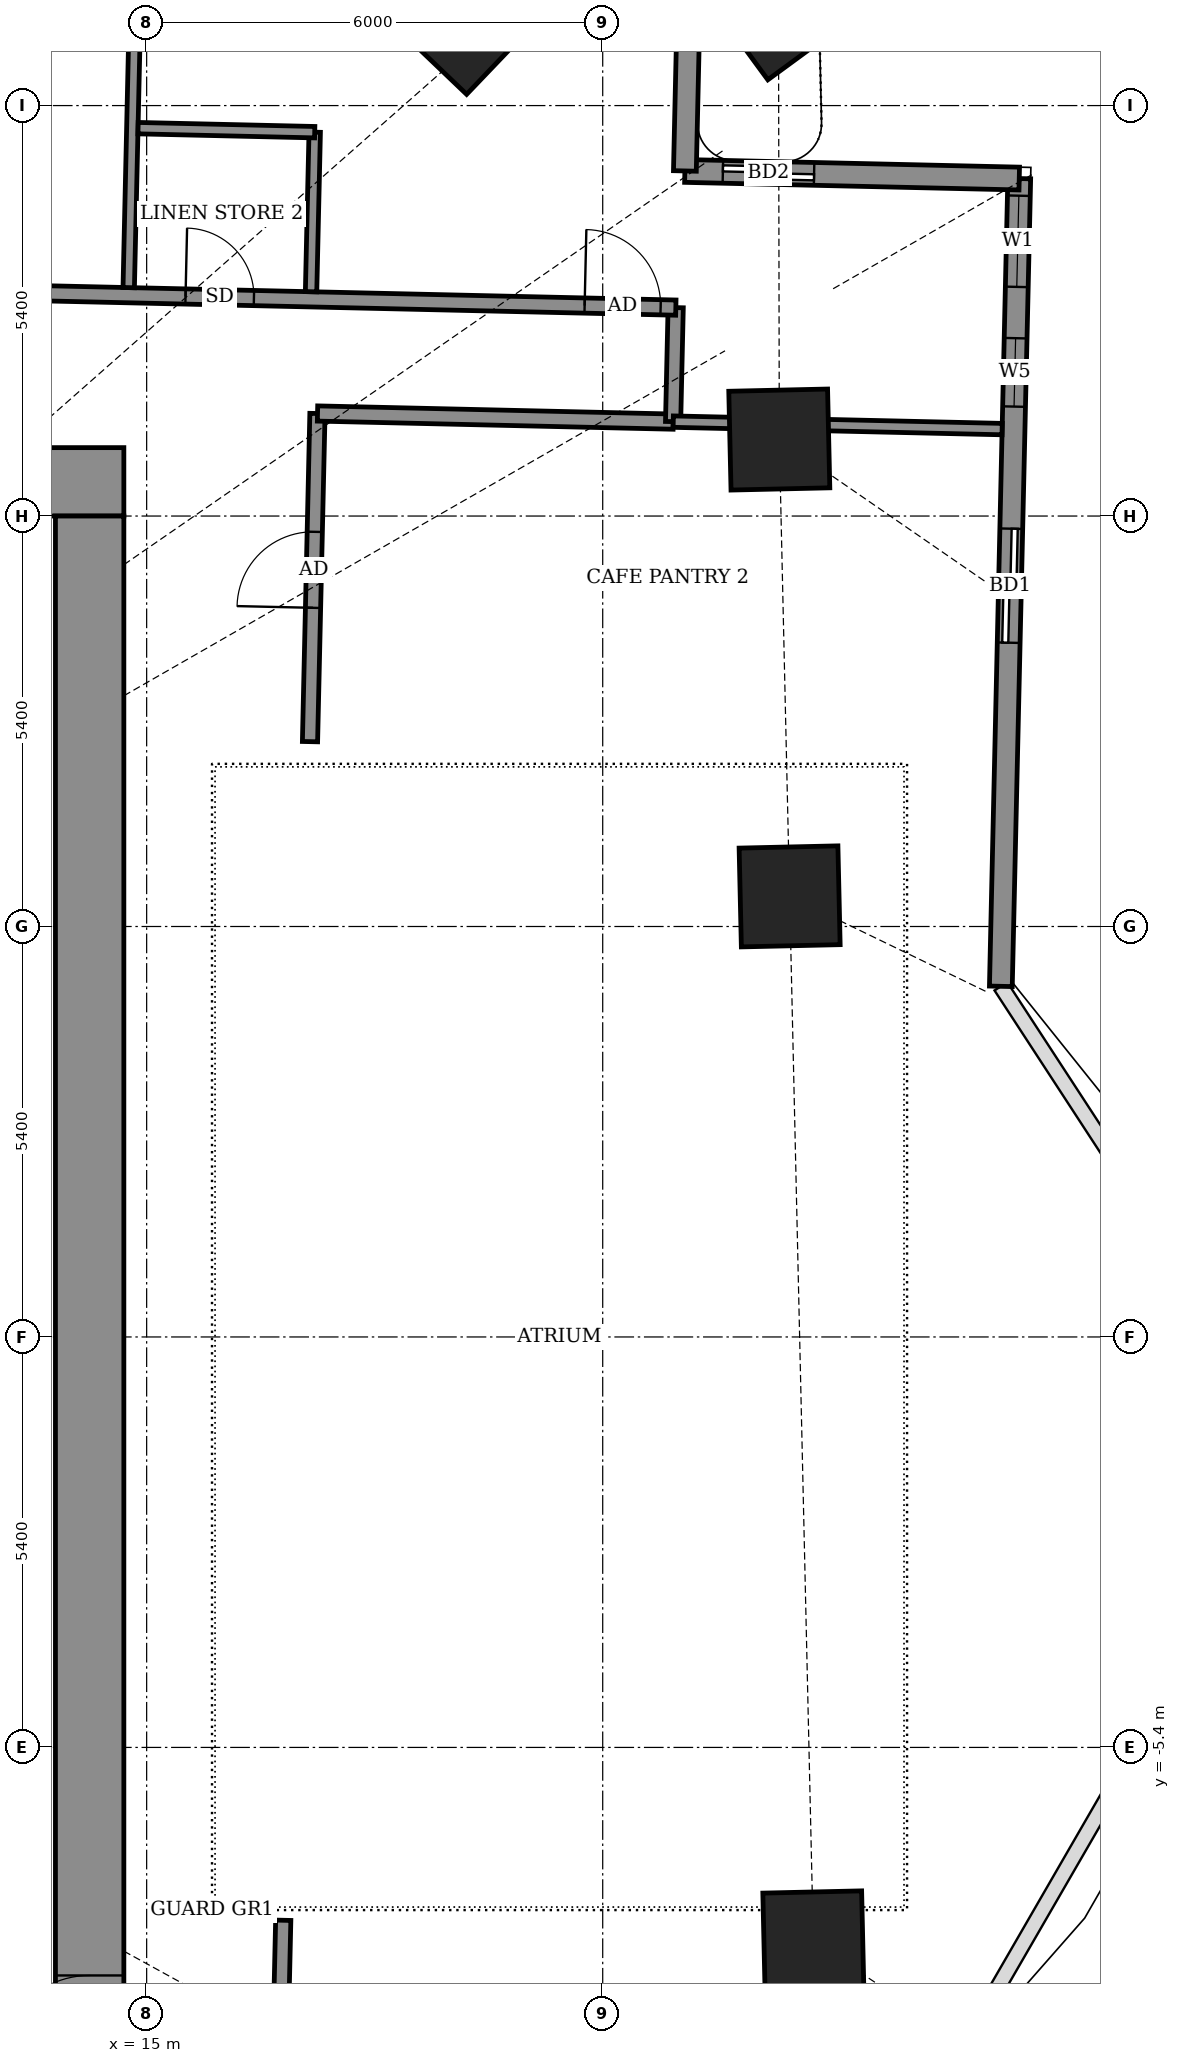
"""IFC4 building model, lengths in metres.
Left out: names, types, materials, properties, quantities, classifications, styles, units other than length and angle.
Written with IfcOpenShell. Run it as: python <this file> out.ifc"""

import sys

from ifc_helpers import new_model, si_unit, direction, frame, frame_2d, origin, origin_2d, place, context, subcontext, project, spatial, rectangle, extrude, element, fill, save


model = new_model("IFC4")
c1 = context("Model", 3, precision=1e-05, world=origin(), true_north=direction((0.0, 1.0)))
c2 = subcontext(c1, "Body", "Model", "MODEL_VIEW")
j1 = project(units=[si_unit("LENGTHUNIT", "METRE"), si_unit("PLANEANGLEUNIT", "RADIAN")], contexts=[c1])
p1 = place(None, origin())
s1 = spatial("IfcSite", under=j1, at=p1, CompositionType="ELEMENT")
p2 = place(p1, origin())
s2 = spatial("IfcBuilding", under=s1, at=p2, CompositionType="ELEMENT")
p3 = place(p2, frame((0.0, 0.0, 148.1)))
s3 = spatial("IfcBuildingStorey", under=s2, at=p3, CompositionType="ELEMENT", Elevation=148.1)
for number, where, z_axis, x_axis in (
    (1, (23.771, -7.952, -0.55), (0.0, 0.0, 1.0), (-0.023, 1.0, 0.0)),
    (2, (23.459, 5.796, -0.55), (0.0, 0.0, 1.0), (-0.023, 1.0, 0.0)),
    (3, (23.323, 11.806, -0.55), (0.0, 0.0, 1.0), (-0.023, 1.0, 0.0)),
    (4, (23.313, 17.448, -0.55), (0.0, 0.0, 1.0), (-0.591, 0.807, 0.0)),
    (5, (19.189, 17.267, -0.55), (0.0, 0.0, 1.0), (-0.723, 0.691, 0.0)),
):
    element("IfcColumn", number, at=place(p3, frame(where, z_axis=z_axis, x_axis=x_axis)), inside=s3, PredefinedType="COLUMN", context=c2, shape_type="SweptSolid", body=[
        extrude(rectangle(XDim=1.3, YDim=1.3, at=origin_2d()), origin(), (0.0, 0.0, 1.0), 4.6),
    ])
p4 = place(p3, frame((26.238, 4.613, 0.0), z_axis=(0.0, 0.0, 1.0), x_axis=(0.022761056451, 0.999740933597, 0.0)))
e6 = element("IfcWall", 6, at=p4, inside=s3, PredefinedType="SOLIDWALL", context=c2, shape_type="SweptSolid", body=[
    extrude(rectangle(XDim=10.63, YDim=0.3, at=frame_2d((5.315, 0.0))), origin(), (0.0, 0.0, 1.0), 2.85),
])
p5 = place(p4, frame((4.522, 0.0, 0.0)))
e7 = element("IfcOpeningElement", 7, at=p5, cuts=e6, PredefinedType="OPENING", context=c2, shape_type="SweptSolid", body=[
    extrude(rectangle(XDim=1.5, YDim=2.4, at=frame_2d((0.75, 1.2))), frame((0.0, 0.16, 0.0), z_axis=(0.0, -1.0, 0.0), x_axis=(1.0, 0.0, 0.0)), (0.0, 0.0, 1.0), 0.32),
])
p6 = place(p4, frame((7.629, 0.0, 0.9)))
e8 = element("IfcOpeningElement", 8, at=p6, cuts=e6, PredefinedType="OPENING", context=c2, shape_type="SweptSolid", body=[
    extrude(rectangle(XDim=0.9, YDim=1.5, at=frame_2d((0.45, 0.75))), frame((0.0, 0.16, 0.0), z_axis=(0.0, -1.0, 0.0), x_axis=(1.0, 0.0, 0.0)), (0.0, 0.0, 1.0), 0.32),
])
p7 = place(p4, frame((9.204, 0.0, 0.9)))
e9 = element("IfcOpeningElement", 9, at=p7, cuts=e6, PredefinedType="OPENING", context=c2, shape_type="SweptSolid", body=[
    extrude(rectangle(XDim=1.2, YDim=1.5, at=frame_2d((0.6, 0.75))), frame((0.0, 0.16, 0.0), z_axis=(0.0, -1.0, 0.0), x_axis=(1.0, 0.0, 0.0)), (0.0, 0.0, 1.0), 0.32),
])
p8 = place(p3, frame((26.48, 15.24, 0.0), z_axis=(0.0, 0.0, 1.0), x_axis=(-0.999741204967, 0.022749133868, 0.0)))
e10 = element("IfcWall", 10, at=p8, inside=s3, PredefinedType="SOLIDWALL", context=c2, shape_type="SweptSolid", body=[
    extrude(rectangle(XDim=4.4, YDim=0.3, at=frame_2d((2.2, 0.0))), origin(), (0.0, 0.0, 1.0), 2.75),
])
p9 = place(p8, frame((2.7, 0.0, 0.0)))
e11 = element("IfcOpeningElement", 11, at=p9, cuts=e10, PredefinedType="OPENING", context=c2, shape_type="SweptSolid", body=[
    extrude(rectangle(XDim=1.2, YDim=2.4, at=frame_2d((0.6, 1.2))), frame((0.0, 0.16, 0.0), z_axis=(0.0, -1.0, 0.0), x_axis=(1.0, 0.0, 0.0)), (0.0, 0.0, 1.0), 0.32),
])
p10 = place(p3, frame((22.081, 15.34, 0.0), z_axis=(0.0, 0.0, 1.0), x_axis=(0.022693676786, 0.999742465355, 0.0)))
e12 = element("IfcWall", 12, at=p10, inside=s3, PredefinedType="SOLIDWALL", context=c2, shape_type="SweptSolid", body=[
    extrude(rectangle(XDim=4.4, YDim=0.3, at=frame_2d((2.2, 0.0))), origin(), (0.0, 0.0, 1.0), 2.75),
])
p11 = place(p10, frame((3.248, 0.0, 0.9)))
e13 = element("IfcOpeningElement", 13, at=p11, cuts=e12, PredefinedType="OPENING", context=c2, shape_type="SweptSolid", body=[
    extrude(rectangle(XDim=0.9, YDim=1.5, at=frame_2d((0.45, 0.75))), frame((0.0, 0.16, 0.0), z_axis=(0.0, -1.0, 0.0), x_axis=(1.0, 0.0, 0.0)), (0.0, 0.0, 1.0), 0.32),
])
p12 = place(p3, frame((16.611, -15.868, 0.0), z_axis=(0.0, 0.0, 1.0), x_axis=(0.022698399288, 0.999742358145, 0.0)))
e14 = element("IfcWall", 14, at=p12, inside=s3, PredefinedType="PARTITIONING", context=c2, shape_type="SweptSolid", body=[
    extrude(rectangle(XDim=8.196, YDim=0.2, at=frame_2d((4.098, 0.0))), origin(), (0.0, 0.0, 1.0), 2.85),
])
p13 = place(p12, frame((3.513, 0.0, 0.0)))
e15 = element("IfcOpeningElement", 15, at=p13, cuts=e14, PredefinedType="OPENING", context=c2, shape_type="SweptSolid", body=[
    extrude(rectangle(XDim=1.0, YDim=2.1, at=frame_2d((0.5, 1.05))), frame((0.0, 0.11, 0.0), z_axis=(0.0, -1.0, 0.0), x_axis=(1.0, 0.0, 0.0)), (0.0, 0.0, 1.0), 0.22),
])
p14 = place(p3, frame((17.149, 7.832, 0.0), z_axis=(0.0, 0.0, 1.0), x_axis=(0.022729111383, 0.999741660378, 0.0)))
e16 = element("IfcWall", 16, at=p14, inside=s3, PredefinedType="PARTITIONING", context=c2, shape_type="SweptSolid", body=[
    extrude(rectangle(XDim=4.318, YDim=0.2, at=frame_2d((2.159, 0.0))), origin(), (0.0, 0.0, 1.0), 2.85),
])
p15 = place(p14, frame((1.761, 0.0, 0.0)))
e17 = element("IfcOpeningElement", 17, at=p15, cuts=e16, PredefinedType="OPENING", context=c2, shape_type="SweptSolid", body=[
    extrude(rectangle(XDim=1.0, YDim=2.1, at=frame_2d((0.5, 1.05))), frame((0.0, 0.11, 0.0), z_axis=(0.0, -1.0, 0.0), x_axis=(1.0, 0.0, 0.0)), (0.0, 0.0, 1.0), 0.22),
])
p16 = place(p3, frame((17.248, 12.149, 0.0), z_axis=(0.0, 0.0, 1.0), x_axis=(0.999739054811, -0.022843429809, 0.0)))
e18 = element("IfcWall", 18, at=p16, inside=s3, PredefinedType="PARTITIONING", context=c2, shape_type="SweptSolid", body=[
    extrude(rectangle(XDim=4.681, YDim=0.2, at=frame_2d((2.341, 0.0))), origin(), (0.0, 0.0, 1.0), 2.85),
])
p17 = place(p3, frame((21.926, 12.042, 0.0), z_axis=(0.0, 0.0, 1.0), x_axis=(0.022617910375, 0.999744182344, 0.0)))
e19 = element("IfcWall", 19, at=p17, inside=s3, PredefinedType="PARTITIONING", context=c2, shape_type="SweptSolid", body=[
    extrude(rectangle(XDim=1.5, YDim=0.2, at=frame_2d((0.75, 0.0))), origin(), (0.0, 0.0, 1.0), 2.85),
])
p18 = place(p3, frame((21.928, 12.042, 0.0), z_axis=(0.0, 0.0, 1.0), x_axis=(0.999744131062, -0.022620176977, 0.0)))
e20 = element("IfcWall", 20, at=p18, inside=s3, PredefinedType="PARTITIONING", context=c2, shape_type="SweptSolid", body=[
    extrude(rectangle(XDim=4.328, YDim=0.15, at=frame_2d((2.164, 0.0))), origin(), (0.0, 0.0, 1.0), 2.85),
])
p19 = place(p3, frame((-21.279, 14.523, 0.0), z_axis=(0.0, 0.0, 1.0), x_axis=(0.999742775939, -0.022679990253, 0.0)))
e21 = element("IfcWall", 21, at=p19, inside=s3, PredefinedType="PARTITIONING", context=c2, shape_type="SweptSolid", body=[
    extrude(rectangle(XDim=43.252, YDim=0.2, at=frame_2d((21.626, 0.0))), origin(), (0.0, 0.0, 1.0), 2.75),
])
p20 = place(p19, frame((42.052, 0.0, 0.0)))
e22 = element("IfcOpeningElement", 22, at=p20, cuts=e21, PredefinedType="OPENING", context=c2, shape_type="SweptSolid", body=[
    extrude(rectangle(XDim=1.0, YDim=2.1, at=frame_2d((0.5, 1.05))), frame((0.0, 0.11, 0.0), z_axis=(0.0, -1.0, 0.0), x_axis=(1.0, 0.0, 0.0)), (0.0, 0.0, 1.0), 0.22),
])
p21 = place(p19, frame((36.8, 0.0, 0.0)))
e23 = element("IfcOpeningElement", 23, at=p21, cuts=e21, PredefinedType="OPENING", context=c2, shape_type="SweptSolid", body=[
    extrude(rectangle(XDim=0.9, YDim=2.1, at=frame_2d((0.45, 1.05))), frame((0.0, 0.11, 0.0), z_axis=(0.0, -1.0, 0.0), x_axis=(1.0, 0.0, 0.0)), (0.0, 0.0, 1.0), 0.22),
])
p22 = place(p19, frame((32.625, 0.0, 0.0)))
e24 = element("IfcOpeningElement", 24, at=p22, cuts=e21, PredefinedType="OPENING", context=c2, shape_type="SweptSolid", body=[
    extrude(rectangle(XDim=1.0, YDim=2.1, at=frame_2d((0.5, 1.05))), frame((0.0, 0.11, 0.0), z_axis=(0.0, -1.0, 0.0), x_axis=(1.0, 0.0, 0.0)), (0.0, 0.0, 1.0), 0.22),
])
p23 = place(p19, frame((27.9, 0.0, 0.0)))
e25 = element("IfcOpeningElement", 25, at=p23, cuts=e21, PredefinedType="OPENING", context=c2, shape_type="SweptSolid", body=[
    extrude(rectangle(XDim=1.0, YDim=2.1, at=frame_2d((0.5, 1.05))), frame((0.0, 0.11, 0.0), z_axis=(0.0, -1.0, 0.0), x_axis=(1.0, 0.0, 0.0)), (0.0, 0.0, 1.0), 0.22),
])
p24 = place(p19, frame((24.95, 0.0, 0.0)))
e26 = element("IfcOpeningElement", 26, at=p24, cuts=e21, PredefinedType="OPENING", context=c2, shape_type="SweptSolid", body=[
    extrude(rectangle(XDim=0.9, YDim=2.1, at=frame_2d((0.45, 1.05))), frame((0.0, 0.11, 0.0), z_axis=(0.0, -1.0, 0.0), x_axis=(1.0, 0.0, 0.0)), (0.0, 0.0, 1.0), 0.22),
])
p25 = place(p19, frame((20.075, 0.0, 0.0)))
e27 = element("IfcOpeningElement", 27, at=p25, cuts=e21, PredefinedType="OPENING", context=c2, shape_type="SweptSolid", body=[
    extrude(rectangle(XDim=0.9, YDim=2.1, at=frame_2d((0.45, 1.05))), frame((0.0, 0.11, 0.0), z_axis=(0.0, -1.0, 0.0), x_axis=(1.0, 0.0, 0.0)), (0.0, 0.0, 1.0), 0.22),
])
p26 = place(p19, frame((16.25, 0.0, 0.0)))
e28 = element("IfcOpeningElement", 28, at=p26, cuts=e21, PredefinedType="OPENING", context=c2, shape_type="SweptSolid", body=[
    extrude(rectangle(XDim=1.0, YDim=2.1, at=frame_2d((0.5, 1.05))), frame((0.0, 0.11, 0.0), z_axis=(0.0, -1.0, 0.0), x_axis=(1.0, 0.0, 0.0)), (0.0, 0.0, 1.0), 0.22),
])
p27 = place(p19, frame((12.6, 0.0, 0.0)))
e29 = element("IfcOpeningElement", 29, at=p27, cuts=e21, PredefinedType="OPENING", context=c2, shape_type="SweptSolid", body=[
    extrude(rectangle(XDim=0.9, YDim=2.1, at=frame_2d((0.45, 1.05))), frame((0.0, 0.11, 0.0), z_axis=(0.0, -1.0, 0.0), x_axis=(1.0, 0.0, 0.0)), (0.0, 0.0, 1.0), 0.22),
])
p28 = place(p19, frame((3.525, 0.0, 0.0)))
e30 = element("IfcOpeningElement", 30, at=p28, cuts=e21, PredefinedType="OPENING", context=c2, shape_type="SweptSolid", body=[
    extrude(rectangle(XDim=1.0, YDim=2.1, at=frame_2d((0.5, 1.05))), frame((0.0, 0.11, 0.0), z_axis=(0.0, -1.0, 0.0), x_axis=(1.0, 0.0, 0.0)), (0.0, 0.0, 1.0), 0.22),
])
p29 = place(p19, frame((10.2, 0.0, 0.0)))
e31 = element("IfcOpeningElement", 31, at=p29, cuts=e21, PredefinedType="OPENING", context=c2, shape_type="SweptSolid", body=[
    extrude(rectangle(XDim=0.9, YDim=2.1, at=frame_2d((0.45, 1.05))), frame((0.0, 0.11, 0.0), z_axis=(0.0, -1.0, 0.0), x_axis=(1.0, 0.0, 0.0)), (0.0, 0.0, 1.0), 0.22),
])
p30 = place(p3, frame((14.764, 13.805, 0.0), z_axis=(0.0, 0.0, 1.0), x_axis=(0.022688785847, 0.999742576365, 0.0)))
e32 = element("IfcWall", 32, at=p30, inside=s3, PredefinedType="PARTITIONING", context=c2, shape_type="SweptSolid", body=[
    extrude(rectangle(XDim=5.95, YDim=0.15, at=frame_2d((2.975, 0.0))), origin(), (0.0, 0.0, 1.0), 2.85),
])
p31 = place(p3, frame((17.163, 13.751, 0.0), z_axis=(0.0, 0.0, 1.0), x_axis=(0.02279007832, 0.999740272436, 0.0)))
e33 = element("IfcWall", 33, at=p31, inside=s3, PredefinedType="PARTITIONING", context=c2, shape_type="SweptSolid", body=[
    extrude(rectangle(XDim=2.1, YDim=0.15, at=frame_2d((1.05, 0.0))), origin(), (0.0, 0.0, 1.0), 2.85),
])
p32 = place(p3, frame((14.887, 15.903, 0.0), z_axis=(0.0, 0.0, 1.0), x_axis=(0.999740260747, -0.02279059109, 0.0)))
e34 = element("IfcWall", 34, at=p32, inside=s3, PredefinedType="PARTITIONING", context=c2, shape_type="SweptSolid", body=[
    extrude(rectangle(XDim=2.324, YDim=0.15, at=frame_2d((1.162, 0.0))), origin(), (0.0, 0.0, 1.0), 2.85),
])
p33 = place(p3, frame((-14.7, 11.25, 0.0), z_axis=(0.0, 0.0, 1.0), x_axis=(1.0, 0.0, 0.0)))
e35 = element("IfcWall", 35, at=p33, inside=s3, PredefinedType="SHEAR", context=c2, shape_type="SweptSolid", body=[
    extrude(rectangle(XDim=29.4, YDim=0.9, at=frame_2d((14.7, 0.0))), origin(), (0.0, 0.0, 1.0), 4.6),
])
p34 = place(p3, frame((14.25, -10.8, 0.0), z_axis=(0.0, 0.0, 1.0), x_axis=(0.0, 1.0, 0.0)))
e36 = element("IfcWall", 36, at=p34, inside=s3, PredefinedType="SHEAR", context=c2, shape_type="SweptSolid", body=[
    extrude(rectangle(XDim=21.6, YDim=0.9, at=frame_2d((10.8, 0.0))), origin(), (0.0, 0.0, 1.0), 4.6),
])
p35 = place(p34, frame((1.2, 0.0, 0.0)))
e37 = element("IfcOpeningElement", 37, at=p35, cuts=e36, PredefinedType="OPENING", context=c2, shape_type="SweptSolid", body=[
    extrude(rectangle(XDim=1.2, YDim=2.1, at=frame_2d((0.6, 1.05))), frame((0.0, 0.46, 0.0), z_axis=(0.0, -1.0, 0.0), x_axis=(1.0, 0.0, 0.0)), (0.0, 0.0, 1.0), 0.92),
])
p36 = place(p5, origin())
e38 = element("IfcDoor", 38, at=p36, inside=s3, OperationType="SLIDING_TO_LEFT", PredefinedType="DOOR", context=c2, shape_type="SweptSolid", body=[
    extrude(rectangle(XDim=1.5, YDim=2.4, at=frame_2d((0.75, 1.2))), frame((0.0, 0.025, 0.0), z_axis=(0.0, -1.0, 0.0), x_axis=(1.0, 0.0, 0.0)), (0.0, 0.0, 1.0), 0.05),
])
fill(e7, e38)
p37 = place(p6, origin())
e39 = element("IfcWindow", 39, at=p37, inside=s3, PartitioningType="SINGLE_PANEL", PredefinedType="WINDOW", context=c2, shape_type="SweptSolid", body=[
    extrude(rectangle(XDim=0.9, YDim=1.5, at=frame_2d((0.45, 0.75))), frame((0.0, 0.03, 0.0), z_axis=(0.0, -1.0, 0.0), x_axis=(1.0, 0.0, 0.0)), (0.0, 0.0, 1.0), 0.06),
])
fill(e8, e39)
p38 = place(p7, origin())
e40 = element("IfcWindow", 40, at=p38, inside=s3, PartitioningType="SINGLE_PANEL", PredefinedType="WINDOW", context=c2, shape_type="SweptSolid", body=[
    extrude(rectangle(XDim=1.2, YDim=1.5, at=frame_2d((0.6, 0.75))), frame((0.0, 0.03, 0.0), z_axis=(0.0, -1.0, 0.0), x_axis=(1.0, 0.0, 0.0)), (0.0, 0.0, 1.0), 0.06),
])
fill(e9, e40)
p39 = place(p9, origin())
e41 = element("IfcDoor", 41, at=p39, inside=s3, OperationType="SLIDING_TO_LEFT", PredefinedType="DOOR", context=c2, shape_type="SweptSolid", body=[
    extrude(rectangle(XDim=1.2, YDim=2.4, at=frame_2d((0.6, 1.2))), frame((0.0, 0.025, 0.0), z_axis=(0.0, -1.0, 0.0), x_axis=(1.0, 0.0, 0.0)), (0.0, 0.0, 1.0), 0.05),
])
fill(e11, e41)
p40 = place(p15, origin())
e42 = element("IfcDoor", 42, at=p40, inside=s3, OperationType="SINGLE_SWING_LEFT", PredefinedType="DOOR", context=c2, shape_type="SweptSolid", body=[
    extrude(rectangle(XDim=1.0, YDim=2.1, at=frame_2d((0.5, 1.05))), frame((0.0, 0.025, 0.0), z_axis=(0.0, -1.0, 0.0), x_axis=(1.0, 0.0, 0.0)), (0.0, 0.0, 1.0), 0.05),
])
fill(e17, e42)
p41 = place(p20, origin())
e43 = element("IfcDoor", 43, at=p41, inside=s3, OperationType="SINGLE_SWING_RIGHT", PredefinedType="DOOR", context=c2, shape_type="SweptSolid", body=[
    extrude(rectangle(XDim=1.0, YDim=2.1, at=frame_2d((0.5, 1.05))), frame((0.0, 0.025, 0.0), z_axis=(0.0, -1.0, 0.0), x_axis=(1.0, 0.0, 0.0)), (0.0, 0.0, 1.0), 0.05),
])
fill(e22, e43)
p42 = place(p21, origin())
e44 = element("IfcDoor", 44, at=p42, inside=s3, OperationType="SINGLE_SWING_LEFT", PredefinedType="DOOR", context=c2, shape_type="SweptSolid", body=[
    extrude(rectangle(XDim=0.9, YDim=2.1, at=frame_2d((0.45, 1.05))), frame((0.0, 0.025, 0.0), z_axis=(0.0, -1.0, 0.0), x_axis=(1.0, 0.0, 0.0)), (0.0, 0.0, 1.0), 0.05),
])
fill(e23, e44)
p43 = place(p35, origin())
e45 = element("IfcDoor", 45, at=p43, inside=s3, OperationType="DOUBLE_DOOR_SINGLE_SWING", PredefinedType="DOOR", context=c2, shape_type="SweptSolid", body=[
    extrude(rectangle(XDim=1.2, YDim=2.1, at=frame_2d((0.6, 1.05))), frame((0.0, 0.025, 0.0), z_axis=(0.0, -1.0, 0.0), x_axis=(1.0, 0.0, 0.0)), (0.0, 0.0, 1.0), 0.05),
])
fill(e37, e45)
save(model, sys.argv[1])
